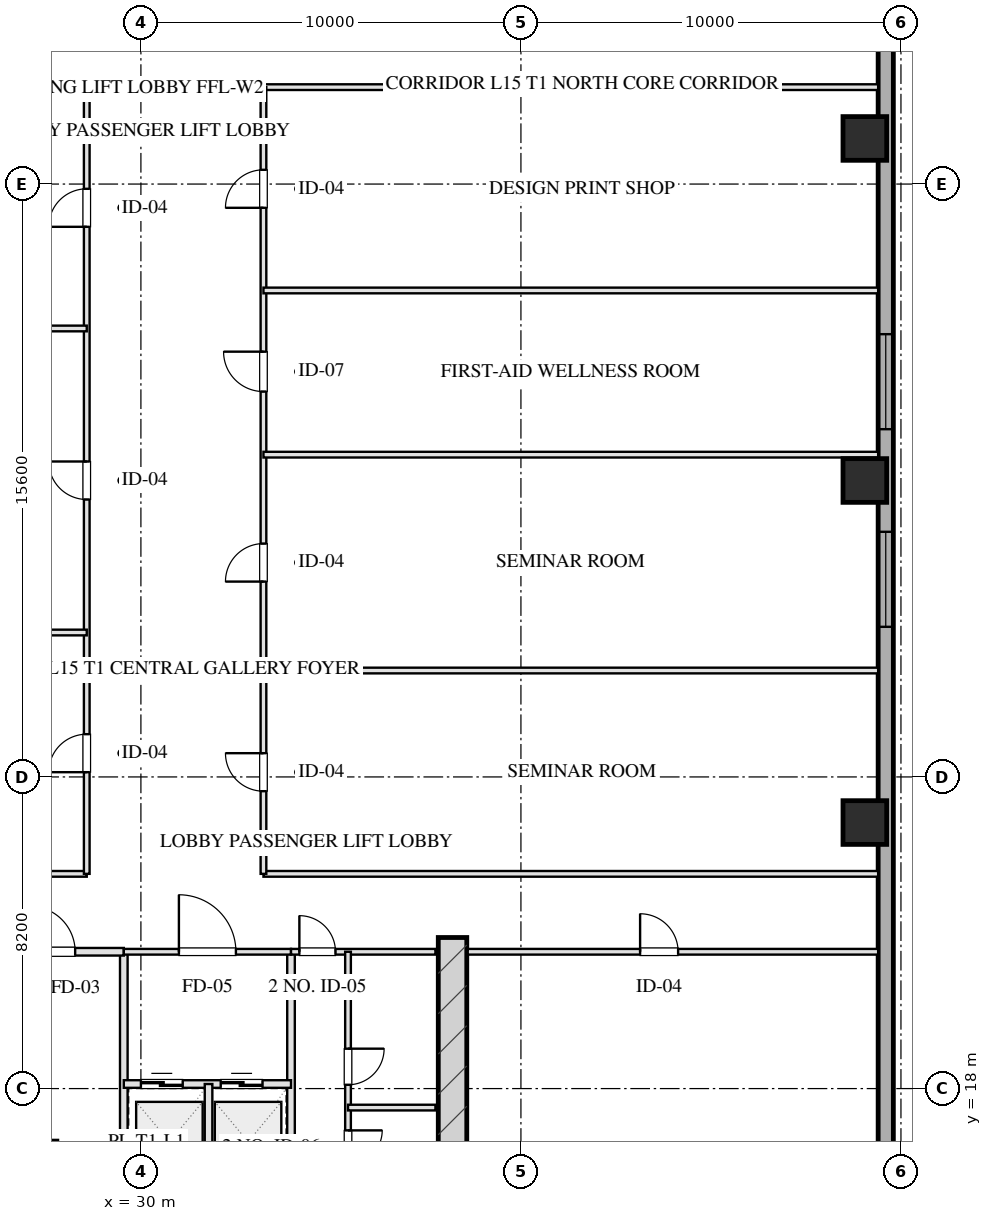
"""IFC4 building model, lengths in metres.
Left out: names, types, materials, properties, quantities, classifications, styles, units other than length and angle.
Written with IfcOpenShell. Run it as: python <this file> out.ifc"""

import sys

from ifc_helpers import new_model, si_unit, direction, frame, frame_2d, origin, origin_2d, place, context, subcontext, project, spatial, rectangle, hollow_rectangle, extrude, element, fill, save


model = new_model("IFC4")
c1 = context("Model", 3, precision=1e-05, world=origin(), true_north=direction((0.0, 1.0)))
c2 = subcontext(c1, "Body", "Model", "MODEL_VIEW")
j1 = project(units=[si_unit("LENGTHUNIT", "METRE"), si_unit("PLANEANGLEUNIT", "RADIAN")], contexts=[c1])
p1 = place(None, origin())
s1 = spatial("IfcSite", under=j1, at=p1, CompositionType="ELEMENT")
p2 = place(p1, origin())
s2 = spatial("IfcBuilding", under=s1, at=p2, CompositionType="ELEMENT")
p3 = place(p2, frame((0.0, 0.0, 64.4)))
s3 = spatial("IfcBuildingStorey", under=s2, at=p3, CompositionType="ELEMENT", Elevation=64.4)
p4 = place(p3, frame((38.2, 21.975, 0.0), z_axis=(0.0, 0.0, 1.0), x_axis=(0.0, -1.0, 0.0)))
e1 = element("IfcWall", 1, at=p4, inside=s3, PredefinedType="SHEAR", context=c2, shape_type="SweptSolid", body=[
    extrude(rectangle(XDim=9.63, YDim=0.75, at=frame_2d((4.815, 0.0))), origin(), (0.0, 0.0, 1.0), 3.45),
])
for number, where, z_axis, x_axis in (
    (2, (49.05, 25.0, 0.0), (0.0, 0.0, 1.0), (1.0, 0.0, 0.0)),
    (3, (49.05, 34.0, 0.0), (0.0, 0.0, 1.0), (1.0, 0.0, 0.0)),
    (4, (49.05, 43.0, 0.0), (0.0, 0.0, 1.0), (1.0, 0.0, 0.0)),
):
    element("IfcColumn", number, at=place(p3, frame(where, z_axis=z_axis, x_axis=x_axis)), inside=s3, PredefinedType="COLUMN", context=c2, shape_type="SweptSolid", body=[
        extrude(hollow_rectangle(XDim=1.15, YDim=1.15, WallThickness=0.04, at=origin_2d()), origin(), (0.0, 0.0, 1.0), 3.451),
    ])
p5 = place(p3, frame((49.6, 60.8, 0.0), z_axis=(0.0, 0.0, 1.0), x_axis=(0.0, -1.0, 0.0)))
e5 = element("IfcWall", 5, at=p5, inside=s3, PredefinedType="SOLIDWALL", context=c2, shape_type="SweptSolid", body=[
    extrude(rectangle(XDim=53.6, YDim=0.4, at=frame_2d((26.8, 0.0))), origin(), (0.0, 0.0, 1.0), 2.61),
])
p6 = place(p5, frame((28.15, 0.0, 0.75)))
e6 = element("IfcOpeningElement", 6, at=p6, cuts=e5, PredefinedType="OPENING", context=c2, shape_type="SweptSolid", body=[
    extrude(rectangle(XDim=2.5, YDim=1.46, at=frame_2d((1.25, 0.73))), frame((0.0, 0.21, 0.0), z_axis=(0.0, -1.0, 0.0), x_axis=(1.0, 0.0, 0.0)), (0.0, 0.0, 1.0), 0.42),
])
p7 = place(p5, frame((22.95, 0.0, 0.75)))
e7 = element("IfcOpeningElement", 7, at=p7, cuts=e5, PredefinedType="OPENING", context=c2, shape_type="SweptSolid", body=[
    extrude(rectangle(XDim=2.5, YDim=1.46, at=frame_2d((1.25, 0.73))), frame((0.0, 0.21, 0.0), z_axis=(0.0, -1.0, 0.0), x_axis=(1.0, 0.0, 0.0)), (0.0, 0.0, 1.0), 0.42),
])
p8 = place(p3, frame((29.55, 21.6, 0.0), z_axis=(0.0, 0.0, 1.0), x_axis=(0.0, -1.0, 0.0)))
e8 = element("IfcWall", 8, at=p8, inside=s3, PredefinedType="PARTITIONING", context=c2, shape_type="SweptSolid", body=[
    extrude(rectangle(XDim=8.43, YDim=0.2, at=frame_2d((4.215, 0.0))), origin(), (0.0, 0.0, 1.0), 3.175),
])
p9 = place(p3, frame((25.72, 21.6, 0.0), z_axis=(0.0, 0.0, 1.0), x_axis=(1.0, 0.0, 0.0)))
e9 = element("IfcWall", 9, at=p9, inside=s3, PredefinedType="PARTITIONING", context=c2, shape_type="SweptSolid", body=[
    extrude(rectangle(XDim=3.83, YDim=0.2, at=frame_2d((1.915, 0.0))), origin(), (0.0, 0.0, 1.0), 3.175),
])
p10 = place(p9, frame((1.35, 0.0, 0.0)))
e10 = element("IfcOpeningElement", 10, at=p10, cuts=e9, PredefinedType="OPENING", context=c2, shape_type="SweptSolid", body=[
    extrude(rectangle(XDim=1.2, YDim=2.05, at=frame_2d((0.6, 1.025))), frame((0.0, 0.11, 0.0), z_axis=(0.0, -1.0, 0.0), x_axis=(1.0, 0.0, 0.0)), (0.0, 0.0, 1.0), 0.22),
])
p11 = place(p3, frame((25.72, 16.55, 0.0), z_axis=(0.0, 0.0, 1.0), x_axis=(1.0, 0.0, 0.0)))
e11 = element("IfcWall", 11, at=p11, inside=s3, PredefinedType="PARTITIONING", context=c2, shape_type="SweptSolid", body=[
    extrude(rectangle(XDim=2.1, YDim=0.2, at=frame_2d((1.05, 0.0))), origin(), (0.0, 0.0, 1.0), 3.175),
])
p12 = place(p11, frame((0.35, 0.0, 0.0)))
e12 = element("IfcOpeningElement", 12, at=p12, cuts=e11, PredefinedType="OPENING", context=c2, shape_type="SweptSolid", body=[
    extrude(rectangle(XDim=1.1, YDim=2.05, at=frame_2d((0.55, 1.025))), frame((0.0, 0.11, 0.0), z_axis=(0.0, -1.0, 0.0), x_axis=(1.0, 0.0, 0.0)), (0.0, 0.0, 1.0), 0.22),
])
p13 = place(p3, frame((33.95, 21.6, 0.0), z_axis=(0.0, 0.0, 1.0), x_axis=(0.0, -1.0, 0.0)))
e13 = element("IfcWall", 13, at=p13, inside=s3, PredefinedType="PARTITIONING", context=c2, shape_type="SweptSolid", body=[
    extrude(rectangle(XDim=8.43, YDim=0.2, at=frame_2d((4.215, 0.0))), origin(), (0.0, 0.0, 1.0), 3.175),
])
p14 = place(p3, frame((29.55, 21.6, 0.0), z_axis=(0.0, 0.0, 1.0), x_axis=(1.0, 0.0, 0.0)))
e14 = element("IfcWall", 14, at=p14, inside=s3, PredefinedType="PARTITIONING", context=c2, shape_type="SweptSolid", body=[
    extrude(rectangle(XDim=4.4, YDim=0.15, at=frame_2d((2.2, 0.0))), origin(), (0.0, 0.0, 1.0), 3.175),
])
p15 = place(p14, frame((1.45, 0.0, 0.0)))
e15 = element("IfcOpeningElement", 15, at=p15, cuts=e14, PredefinedType="OPENING", context=c2, shape_type="SweptSolid", body=[
    extrude(rectangle(XDim=1.5, YDim=2.05, at=frame_2d((0.75, 1.025))), frame((0.0, 0.085, 0.0), z_axis=(0.0, -1.0, 0.0), x_axis=(1.0, 0.0, 0.0)), (0.0, 0.0, 1.0), 0.17),
])
p16 = place(p3, frame((29.55, 18.12, 0.0), z_axis=(0.0, 0.0, 1.0), x_axis=(1.0, 0.0, 0.0)))
e16 = element("IfcWall", 16, at=p16, inside=s3, PredefinedType="PARTITIONING", context=c2, shape_type="SweptSolid", body=[
    extrude(rectangle(XDim=4.4, YDim=0.2, at=frame_2d((2.2, 0.0))), origin(), (0.0, 0.0, 1.0), 3.175),
])
p17 = place(p16, frame((0.45, 0.0, 0.0)))
e17 = element("IfcOpeningElement", 17, at=p17, cuts=e16, PredefinedType="OPENING", context=c2, shape_type="SweptSolid", body=[
    extrude(rectangle(XDim=1.1, YDim=2.05, at=frame_2d((0.55, 1.025))), frame((0.0, 0.11, 0.0), z_axis=(0.0, -1.0, 0.0), x_axis=(1.0, 0.0, 0.0)), (0.0, 0.0, 1.0), 0.22),
])
p18 = place(p16, frame((2.55, 0.0, 0.0)))
e18 = element("IfcOpeningElement", 18, at=p18, cuts=e16, PredefinedType="OPENING", context=c2, shape_type="SweptSolid", body=[
    extrude(rectangle(XDim=1.1, YDim=2.05, at=frame_2d((0.55, 1.025))), frame((0.0, 0.11, 0.0), z_axis=(0.0, -1.0, 0.0), x_axis=(1.0, 0.0, 0.0)), (0.0, 0.0, 1.0), 0.22),
])
p19 = place(p3, frame((31.78, 18.12, 0.0), z_axis=(0.0, 0.0, 1.0), x_axis=(0.0, -1.0, 0.0)))
e19 = element("IfcWall", 19, at=p19, inside=s3, PredefinedType="PARTITIONING", context=c2, shape_type="SweptSolid", body=[
    extrude(rectangle(XDim=4.95, YDim=0.2, at=frame_2d((2.475, 0.0))), origin(), (0.0, 0.0, 1.0), 3.175),
])
p20 = place(p3, frame((33.95, 21.6, 0.0), z_axis=(0.0, 0.0, 1.0), x_axis=(1.0, 0.0, 0.0)))
e20 = element("IfcWall", 20, at=p20, inside=s3, PredefinedType="PARTITIONING", context=c2, shape_type="SweptSolid", body=[
    extrude(rectangle(XDim=3.8, YDim=0.15, at=frame_2d((1.9, 0.0))), origin(), (0.0, 0.0, 1.0), 3.175),
])
p21 = place(p20, frame((0.22, 0.0, 0.0)))
e21 = element("IfcOpeningElement", 21, at=p21, cuts=e20, PredefinedType="OPENING", context=c2, shape_type="SweptSolid", body=[
    extrude(rectangle(XDim=0.95, YDim=2.05, at=frame_2d((0.475, 1.025))), frame((0.0, 0.085, 0.0), z_axis=(0.0, -1.0, 0.0), x_axis=(1.0, 0.0, 0.0)), (0.0, 0.0, 1.0), 0.17),
])
p22 = place(p3, frame((35.45, 21.6, 0.0), z_axis=(0.0, 0.0, 1.0), x_axis=(0.0, -1.0, 0.0)))
e22 = element("IfcWall", 22, at=p22, inside=s3, PredefinedType="PARTITIONING", context=c2, shape_type="SweptSolid", body=[
    extrude(rectangle(XDim=8.43, YDim=0.15, at=frame_2d((4.215, 0.0))), origin(), (0.0, 0.0, 1.0), 2.815),
])
p23 = place(p22, frame((2.55, 0.0, 0.0)))
e23 = element("IfcOpeningElement", 23, at=p23, cuts=e22, PredefinedType="OPENING", context=c2, shape_type="SweptSolid", body=[
    extrude(rectangle(XDim=0.95, YDim=2.05, at=frame_2d((0.475, 1.025))), frame((0.0, 0.085, 0.0), z_axis=(0.0, -1.0, 0.0), x_axis=(1.0, 0.0, 0.0)), (0.0, 0.0, 1.0), 0.17),
])
p24 = place(p22, frame((4.7, 0.0, 0.0)))
e24 = element("IfcOpeningElement", 24, at=p24, cuts=e22, PredefinedType="OPENING", context=c2, shape_type="SweptSolid", body=[
    extrude(rectangle(XDim=0.9, YDim=2.05, at=frame_2d((0.45, 1.025))), frame((0.0, 0.085, 0.0), z_axis=(0.0, -1.0, 0.0), x_axis=(1.0, 0.0, 0.0)), (0.0, 0.0, 1.0), 0.17),
])
p25 = place(p22, frame((6.8, 0.0, 0.0)))
e25 = element("IfcOpeningElement", 25, at=p25, cuts=e22, PredefinedType="OPENING", context=c2, shape_type="SweptSolid", body=[
    extrude(rectangle(XDim=0.9, YDim=2.05, at=frame_2d((0.45, 1.025))), frame((0.0, 0.085, 0.0), z_axis=(0.0, -1.0, 0.0), x_axis=(1.0, 0.0, 0.0)), (0.0, 0.0, 1.0), 0.17),
])
p26 = place(p3, frame((35.45, 17.5, 0.0), z_axis=(0.0, 0.0, 1.0), x_axis=(1.0, 0.0, 0.0)))
e26 = element("IfcWall", 26, at=p26, inside=s3, PredefinedType="PARTITIONING", context=c2, shape_type="SweptSolid", body=[
    extrude(rectangle(XDim=2.3, YDim=0.15, at=frame_2d((1.15, 0.0))), origin(), (0.0, 0.0, 1.0), 3.175),
])
p27 = place(p3, frame((38.6, 21.6, 0.0), z_axis=(0.0, 0.0, 1.0), x_axis=(1.0, 0.0, 0.0)))
e27 = element("IfcWall", 27, at=p27, inside=s3, PredefinedType="PARTITIONING", context=c2, shape_type="SweptSolid", body=[
    extrude(rectangle(XDim=10.8, YDim=0.15, at=frame_2d((5.4, 0.0))), origin(), (0.0, 0.0, 1.0), 3.175),
])
p28 = place(p27, frame((4.536, 0.0, 0.0)))
e28 = element("IfcOpeningElement", 28, at=p28, cuts=e27, PredefinedType="OPENING", context=c2, shape_type="SweptSolid", body=[
    extrude(rectangle(XDim=1.0, YDim=2.05, at=frame_2d((0.5, 1.025))), frame((0.0, 0.085, 0.0), z_axis=(0.0, -1.0, 0.0), x_axis=(1.0, 0.0, 0.0)), (0.0, 0.0, 1.0), 0.17),
])
p29 = place(p3, frame((10.6, 23.65, 0.0), z_axis=(0.0, 0.0, 1.0), x_axis=(1.0, 0.0, 0.0)))
e29 = element("IfcWall", 29, at=p29, inside=s3, PredefinedType="PARTITIONING", context=c2, shape_type="SweptSolid", body=[
    extrude(rectangle(XDim=17.975, YDim=0.15, at=frame_2d((8.987, 0.0))), origin(), (0.0, 0.0, 1.0), 3.175),
])
p30 = place(p3, frame((33.225, 23.65, 0.0), z_axis=(0.0, 0.0, 1.0), x_axis=(1.0, 0.0, 0.0)))
e30 = element("IfcWall", 30, at=p30, inside=s3, PredefinedType="PARTITIONING", context=c2, shape_type="SweptSolid", body=[
    extrude(rectangle(XDim=16.175, YDim=0.15, at=frame_2d((8.087, 0.0))), origin(), (0.0, 0.0, 1.0), 3.175),
])
p31 = place(p3, frame((10.6, 44.35, 0.0), z_axis=(0.0, 0.0, 1.0), x_axis=(1.0, 0.0, 0.0)))
e31 = element("IfcWall", 31, at=p31, inside=s3, PredefinedType="PARTITIONING", context=c2, shape_type="SweptSolid", body=[
    extrude(rectangle(XDim=17.975, YDim=0.15, at=frame_2d((8.987, 0.0))), origin(), (0.0, 0.0, 1.0), 3.175),
])
p32 = place(p3, frame((33.225, 44.35, 0.0), z_axis=(0.0, 0.0, 1.0), x_axis=(1.0, 0.0, 0.0)))
e32 = element("IfcWall", 32, at=p32, inside=s3, PredefinedType="PARTITIONING", context=c2, shape_type="SweptSolid", body=[
    extrude(rectangle(XDim=16.175, YDim=0.15, at=frame_2d((8.087, 0.0))), origin(), (0.0, 0.0, 1.0), 3.175),
])
p33 = place(p3, frame((28.575, 23.65, 0.0), z_axis=(0.0, 0.0, 1.0), x_axis=(0.0, 1.0, 0.0)))
e33 = element("IfcWall", 33, at=p33, inside=s3, PredefinedType="PARTITIONING", context=c2, shape_type="SweptSolid", body=[
    extrude(rectangle(XDim=20.7, YDim=0.15, at=frame_2d((10.35, 0.0))), origin(), (0.0, 0.0, 1.0), 3.175),
])
p34 = place(p33, frame((2.675, 0.0, 0.0)))
e34 = element("IfcOpeningElement", 34, at=p34, cuts=e33, PredefinedType="OPENING", context=c2, shape_type="SweptSolid", body=[
    extrude(rectangle(XDim=1.0, YDim=2.05, at=frame_2d((0.5, 1.025))), frame((0.0, 0.085, 0.0), z_axis=(0.0, -1.0, 0.0), x_axis=(1.0, 0.0, 0.0)), (0.0, 0.0, 1.0), 0.17),
])
p35 = place(p33, frame((9.85, 0.0, 0.0)))
e35 = element("IfcOpeningElement", 35, at=p35, cuts=e33, PredefinedType="OPENING", context=c2, shape_type="SweptSolid", body=[
    extrude(rectangle(XDim=1.0, YDim=2.05, at=frame_2d((0.5, 1.025))), frame((0.0, 0.085, 0.0), z_axis=(0.0, -1.0, 0.0), x_axis=(1.0, 0.0, 0.0)), (0.0, 0.0, 1.0), 0.17),
])
p36 = place(p33, frame((17.025, 0.0, 0.0)))
e36 = element("IfcOpeningElement", 36, at=p36, cuts=e33, PredefinedType="OPENING", context=c2, shape_type="SweptSolid", body=[
    extrude(rectangle(XDim=1.0, YDim=2.05, at=frame_2d((0.5, 1.025))), frame((0.0, 0.085, 0.0), z_axis=(0.0, -1.0, 0.0), x_axis=(1.0, 0.0, 0.0)), (0.0, 0.0, 1.0), 0.17),
])
p37 = place(p3, frame((33.225, 23.65, 0.0), z_axis=(0.0, 0.0, 1.0), x_axis=(0.0, 1.0, 0.0)))
e37 = element("IfcWall", 37, at=p37, inside=s3, PredefinedType="PARTITIONING", context=c2, shape_type="SweptSolid", body=[
    extrude(rectangle(XDim=20.7, YDim=0.15, at=frame_2d((10.35, 0.0))), origin(), (0.0, 0.0, 1.0), 3.175),
])
p38 = place(p37, frame((2.175, 0.0, 0.0)))
e38 = element("IfcOpeningElement", 38, at=p38, cuts=e37, PredefinedType="OPENING", context=c2, shape_type="SweptSolid", body=[
    extrude(rectangle(XDim=1.0, YDim=2.05, at=frame_2d((0.5, 1.025))), frame((0.0, 0.085, 0.0), z_axis=(0.0, -1.0, 0.0), x_axis=(1.0, 0.0, 0.0)), (0.0, 0.0, 1.0), 0.17),
])
p39 = place(p37, frame((7.69, 0.0, 0.0)))
e39 = element("IfcOpeningElement", 39, at=p39, cuts=e37, PredefinedType="OPENING", context=c2, shape_type="SweptSolid", body=[
    extrude(rectangle(XDim=1.0, YDim=2.05, at=frame_2d((0.5, 1.025))), frame((0.0, 0.085, 0.0), z_axis=(0.0, -1.0, 0.0), x_axis=(1.0, 0.0, 0.0)), (0.0, 0.0, 1.0), 0.17),
])
p40 = place(p37, frame((12.69, 0.0, 0.0)))
e40 = element("IfcOpeningElement", 40, at=p40, cuts=e37, PredefinedType="OPENING", context=c2, shape_type="SweptSolid", body=[
    extrude(rectangle(XDim=1.05, YDim=2.05, at=frame_2d((0.525, 1.025))), frame((0.0, 0.085, 0.0), z_axis=(0.0, -1.0, 0.0), x_axis=(1.0, 0.0, 0.0)), (0.0, 0.0, 1.0), 0.17),
])
p41 = place(p37, frame((17.525, 0.0, 0.0)))
e41 = element("IfcOpeningElement", 41, at=p41, cuts=e37, PredefinedType="OPENING", context=c2, shape_type="SweptSolid", body=[
    extrude(rectangle(XDim=1.0, YDim=2.05, at=frame_2d((0.5, 1.025))), frame((0.0, 0.085, 0.0), z_axis=(0.0, -1.0, 0.0), x_axis=(1.0, 0.0, 0.0)), (0.0, 0.0, 1.0), 0.17),
])
for number, where, z_axis, x_axis in (
    (42, (10.6, 30.0, 0.0), (0.0, 0.0, 1.0), (1.0, 0.0, 0.0)),
    (43, (10.6, 38.0, 0.0), (0.0, 0.0, 1.0), (1.0, 0.0, 0.0)),
):
    element("IfcWall", number, at=place(p3, frame(where, z_axis=z_axis, x_axis=x_axis)), inside=s3, PredefinedType="PARTITIONING", context=c2, shape_type="SweptSolid", body=[
        extrude(rectangle(XDim=17.975, YDim=0.15, at=frame_2d((8.987, 0.0))), origin(), (0.0, 0.0, 1.0), 3.175),
    ])
for number, where, z_axis, x_axis in (
    (44, (33.225, 29.0, 0.0), (0.0, 0.0, 1.0), (1.0, 0.0, 0.0)),
    (45, (33.225, 34.68, 0.0), (0.0, 0.0, 1.0), (1.0, 0.0, 0.0)),
    (46, (33.225, 39.0, 0.0), (0.0, 0.0, 1.0), (1.0, 0.0, 0.0)),
):
    element("IfcWall", number, at=place(p3, frame(where, z_axis=z_axis, x_axis=x_axis)), inside=s3, PredefinedType="PARTITIONING", context=c2, shape_type="SweptSolid", body=[
        extrude(rectangle(XDim=16.175, YDim=0.15, at=frame_2d((8.087, 0.0))), origin(), (0.0, 0.0, 1.0), 3.175),
    ])
p42 = place(p6, origin())
e47 = element("IfcWindow", 47, at=p42, inside=s3, PartitioningType="TRIPLE_PANEL_VERTICAL", PredefinedType="WINDOW", context=c2, shape_type="SweptSolid", body=[
    extrude(rectangle(XDim=2.5, YDim=1.46, at=frame_2d((1.25, 0.73))), frame((0.0, 0.03, 0.0), z_axis=(0.0, -1.0, 0.0), x_axis=(1.0, 0.0, 0.0)), (0.0, 0.0, 1.0), 0.06),
])
fill(e6, e47)
p43 = place(p7, origin())
e48 = element("IfcWindow", 48, at=p43, inside=s3, PartitioningType="TRIPLE_PANEL_VERTICAL", PredefinedType="WINDOW", context=c2, shape_type="SweptSolid", body=[
    extrude(rectangle(XDim=2.5, YDim=1.46, at=frame_2d((1.25, 0.73))), frame((0.0, 0.03, 0.0), z_axis=(0.0, -1.0, 0.0), x_axis=(1.0, 0.0, 0.0)), (0.0, 0.0, 1.0), 0.06),
])
fill(e7, e48)
p44 = place(p10, origin())
e49 = element("IfcDoor", 49, at=p44, inside=s3, OperationType="SINGLE_SWING_LEFT", PredefinedType="DOOR", context=c2, shape_type="SweptSolid", body=[
    extrude(rectangle(XDim=1.2, YDim=2.05, at=frame_2d((0.6, 1.025))), frame((0.0, 0.025, 0.0), z_axis=(0.0, -1.0, 0.0), x_axis=(1.0, 0.0, 0.0)), (0.0, 0.0, 1.0), 0.05),
])
fill(e10, e49)
p45 = place(p15, origin())
e50 = element("IfcDoor", 50, at=p45, inside=s3, OperationType="SINGLE_SWING_LEFT", PredefinedType="DOOR", context=c2, shape_type="SweptSolid", body=[
    extrude(rectangle(XDim=1.5, YDim=2.05, at=frame_2d((0.75, 1.025))), frame((0.0, 0.025, 0.0), z_axis=(0.0, -1.0, 0.0), x_axis=(1.0, 0.0, 0.0)), (0.0, 0.0, 1.0), 0.05),
])
fill(e15, e50)
p46 = place(p17, origin())
e51 = element("IfcDoor", 51, at=p46, inside=s3, OperationType="DOUBLE_DOOR_SLIDING", PredefinedType="DOOR", context=c2, shape_type="SweptSolid", body=[
    extrude(rectangle(XDim=1.1, YDim=2.05, at=frame_2d((0.55, 1.025))), frame((0.0, 0.025, 0.0), z_axis=(0.0, -1.0, 0.0), x_axis=(1.0, 0.0, 0.0)), (0.0, 0.0, 1.0), 0.05),
])
fill(e17, e51)
p47 = place(p18, origin())
e52 = element("IfcDoor", 52, at=p47, inside=s3, OperationType="DOUBLE_DOOR_SLIDING", PredefinedType="DOOR", context=c2, shape_type="SweptSolid", body=[
    extrude(rectangle(XDim=1.1, YDim=2.05, at=frame_2d((0.55, 1.025))), frame((0.0, 0.025, 0.0), z_axis=(0.0, -1.0, 0.0), x_axis=(1.0, 0.0, 0.0)), (0.0, 0.0, 1.0), 0.05),
])
fill(e18, e52)
p48 = place(p21, origin())
e53 = element("IfcDoor", 53, at=p48, inside=s3, OperationType="SINGLE_SWING_LEFT", PredefinedType="DOOR", context=c2, shape_type="SweptSolid", body=[
    extrude(rectangle(XDim=0.95, YDim=2.05, at=frame_2d((0.475, 1.025))), frame((0.0, 0.025, 0.0), z_axis=(0.0, -1.0, 0.0), x_axis=(1.0, 0.0, 0.0)), (0.0, 0.0, 1.0), 0.05),
])
fill(e21, e53)
p49 = place(p23, origin())
e54 = element("IfcDoor", 54, at=p49, inside=s3, OperationType="SINGLE_SWING_LEFT", PredefinedType="DOOR", context=c2, shape_type="SweptSolid", body=[
    extrude(rectangle(XDim=0.95, YDim=2.05, at=frame_2d((0.475, 1.025))), frame((0.0, 0.025, 0.0), z_axis=(0.0, -1.0, 0.0), x_axis=(1.0, 0.0, 0.0)), (0.0, 0.0, 1.0), 0.05),
])
fill(e23, e54)
p50 = place(p24, origin())
e55 = element("IfcDoor", 55, at=p50, inside=s3, OperationType="SINGLE_SWING_LEFT", PredefinedType="DOOR", context=c2, shape_type="SweptSolid", body=[
    extrude(rectangle(XDim=0.9, YDim=2.05, at=frame_2d((0.45, 1.025))), frame((0.0, 0.025, 0.0), z_axis=(0.0, -1.0, 0.0), x_axis=(1.0, 0.0, 0.0)), (0.0, 0.0, 1.0), 0.05),
])
fill(e24, e55)
p51 = place(p28, origin())
e56 = element("IfcDoor", 56, at=p51, inside=s3, OperationType="SINGLE_SWING_LEFT", PredefinedType="DOOR", context=c2, shape_type="SweptSolid", body=[
    extrude(rectangle(XDim=1.0, YDim=2.05, at=frame_2d((0.5, 1.025))), frame((0.0, 0.025, 0.0), z_axis=(0.0, -1.0, 0.0), x_axis=(1.0, 0.0, 0.0)), (0.0, 0.0, 1.0), 0.05),
])
fill(e28, e56)
p52 = place(p34, origin())
e57 = element("IfcDoor", 57, at=p52, inside=s3, OperationType="SINGLE_SWING_LEFT", PredefinedType="DOOR", context=c2, shape_type="SweptSolid", body=[
    extrude(rectangle(XDim=1.0, YDim=2.05, at=frame_2d((0.5, 1.025))), frame((0.0, 0.025, 0.0), z_axis=(0.0, -1.0, 0.0), x_axis=(1.0, 0.0, 0.0)), (0.0, 0.0, 1.0), 0.05),
])
fill(e34, e57)
p53 = place(p35, origin())
e58 = element("IfcDoor", 58, at=p53, inside=s3, OperationType="SINGLE_SWING_RIGHT", PredefinedType="DOOR", context=c2, shape_type="SweptSolid", body=[
    extrude(rectangle(XDim=1.0, YDim=2.05, at=frame_2d((0.5, 1.025))), frame((0.0, 0.025, 0.0), z_axis=(0.0, -1.0, 0.0), x_axis=(1.0, 0.0, 0.0)), (0.0, 0.0, 1.0), 0.05),
])
fill(e35, e58)
p54 = place(p36, origin())
e59 = element("IfcDoor", 59, at=p54, inside=s3, OperationType="SINGLE_SWING_LEFT", PredefinedType="DOOR", context=c2, shape_type="SweptSolid", body=[
    extrude(rectangle(XDim=1.0, YDim=2.05, at=frame_2d((0.5, 1.025))), frame((0.0, 0.025, 0.0), z_axis=(0.0, -1.0, 0.0), x_axis=(1.0, 0.0, 0.0)), (0.0, 0.0, 1.0), 0.05),
])
fill(e36, e59)
p55 = place(p38, origin())
e60 = element("IfcDoor", 60, at=p55, inside=s3, OperationType="SINGLE_SWING_RIGHT", PredefinedType="DOOR", context=c2, shape_type="SweptSolid", body=[
    extrude(rectangle(XDim=1.0, YDim=2.05, at=frame_2d((0.5, 1.025))), frame((0.0, 0.025, 0.0), z_axis=(0.0, -1.0, 0.0), x_axis=(1.0, 0.0, 0.0)), (0.0, 0.0, 1.0), 0.05),
])
fill(e38, e60)
p56 = place(p39, origin())
e61 = element("IfcDoor", 61, at=p56, inside=s3, OperationType="SINGLE_SWING_LEFT", PredefinedType="DOOR", context=c2, shape_type="SweptSolid", body=[
    extrude(rectangle(XDim=1.0, YDim=2.05, at=frame_2d((0.5, 1.025))), frame((0.0, 0.025, 0.0), z_axis=(0.0, -1.0, 0.0), x_axis=(1.0, 0.0, 0.0)), (0.0, 0.0, 1.0), 0.05),
])
fill(e39, e61)
p57 = place(p40, origin())
e62 = element("IfcDoor", 62, at=p57, inside=s3, OperationType="SINGLE_SWING_RIGHT", PredefinedType="DOOR", context=c2, shape_type="SweptSolid", body=[
    extrude(rectangle(XDim=1.05, YDim=2.05, at=frame_2d((0.525, 1.025))), frame((0.0, 0.025, 0.0), z_axis=(0.0, -1.0, 0.0), x_axis=(1.0, 0.0, 0.0)), (0.0, 0.0, 1.0), 0.05),
])
fill(e40, e62)
p58 = place(p41, origin())
e63 = element("IfcDoor", 63, at=p58, inside=s3, OperationType="SINGLE_SWING_LEFT", PredefinedType="DOOR", context=c2, shape_type="SweptSolid", body=[
    extrude(rectangle(XDim=1.0, YDim=2.05, at=frame_2d((0.5, 1.025))), frame((0.0, 0.025, 0.0), z_axis=(0.0, -1.0, 0.0), x_axis=(1.0, 0.0, 0.0)), (0.0, 0.0, 1.0), 0.05),
])
fill(e41, e63)
save(model, sys.argv[1])
